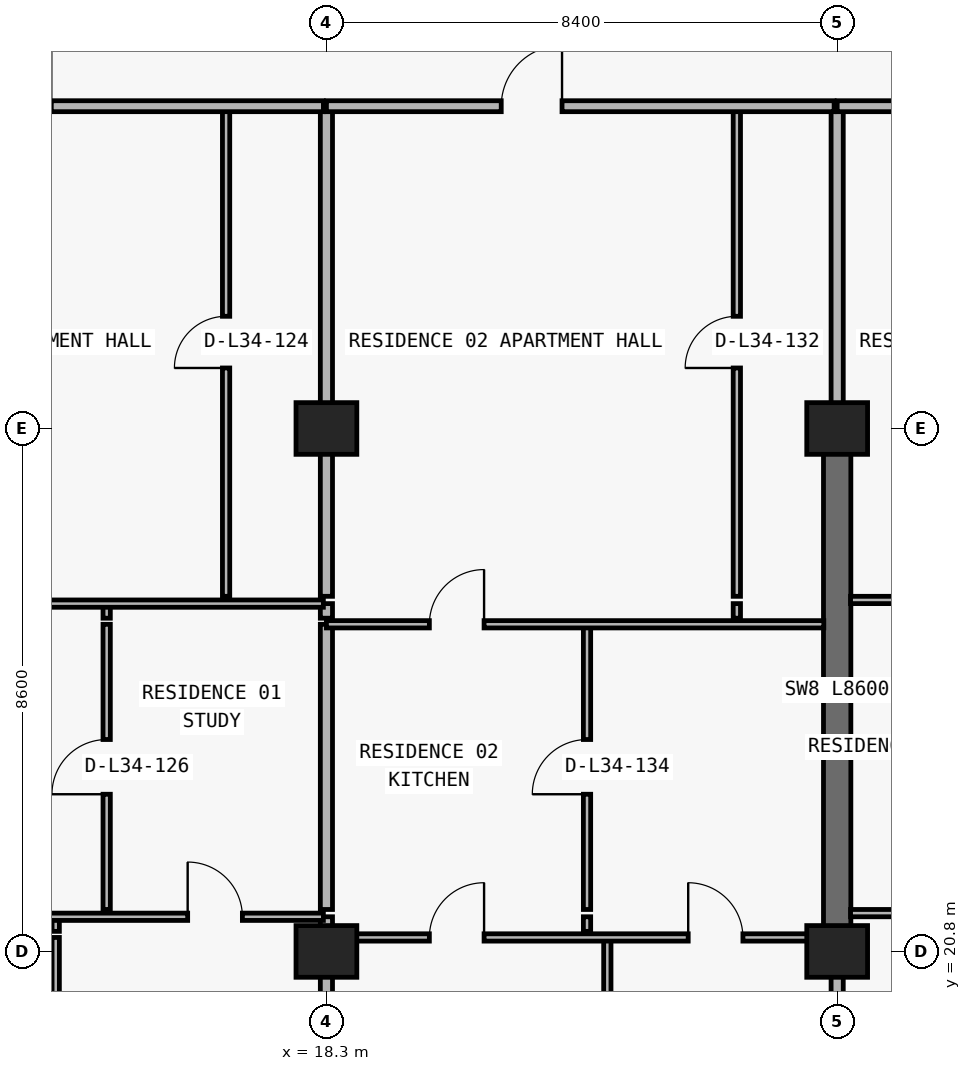
"""IFC4 building model, lengths in metres.
Left out: names, types, materials, properties, quantities, classifications, styles, units other than length and angle.
Written with IfcOpenShell. Run it as: python <this file> out.ifc"""

import sys

from ifc_helpers import new_model, si_unit, direction, frame, frame_2d, origin, origin_2d, place, context, subcontext, project, spatial, rectangle, extrude, element, fill, save


model = new_model("IFC4")
c1 = context("Model", 3, precision=1e-05, world=origin(), true_north=direction((0.0, 1.0)))
c2 = subcontext(c1, "Body", "Model", "MODEL_VIEW")
j1 = project(units=[si_unit("LENGTHUNIT", "METRE"), si_unit("PLANEANGLEUNIT", "RADIAN")], contexts=[c1])
p1 = place(None, origin())
s1 = spatial("IfcSite", under=j1, at=p1, CompositionType="ELEMENT")
p2 = place(p1, origin())
s2 = spatial("IfcBuilding", under=s1, at=p2, CompositionType="ELEMENT")
p3 = place(p2, frame((0.0, 0.0, 125.7)))
s3 = spatial("IfcBuildingStorey", under=s2, at=p3, CompositionType="ELEMENT", Elevation=125.7)
for number, where, z_axis, x_axis in (
    (1, (18.3, 20.8, 0.0), (0.0, 0.0, 1.0), (1.0, 0.0, 0.0)),
    (2, (26.7, 20.8, 0.0), (0.0, 0.0, 1.0), (1.0, 0.0, 0.0)),
    (3, (18.3, 29.4, 0.0), (0.0, 0.0, 1.0), (1.0, 0.0, 0.0)),
    (4, (26.7, 29.4, 0.0), (0.0, 0.0, 1.0), (1.0, 0.0, 0.0)),
):
    element("IfcColumn", number, at=place(p3, frame(where, z_axis=z_axis, x_axis=x_axis)), inside=s3, PredefinedType="COLUMN", context=c2, shape_type="SweptSolid", body=[
        extrude(rectangle(XDim=1.0, YDim=0.85, at=origin_2d()), origin(), (0.0, 0.0, 1.0), 3.05),
    ])
p4 = place(p3, frame((26.7, 20.8, 0.0), z_axis=(0.0, 0.0, 1.0), x_axis=(0.0, 1.0, 0.0)))
e5 = element("IfcWall", 5, at=p4, inside=s3, PredefinedType="SHEAR", context=c2, shape_type="SweptSolid", body=[
    extrude(rectangle(XDim=8.6, YDim=0.45, at=frame_2d((4.3, 0.0))), origin(), (0.0, 0.0, 1.0), 3.05),
])
p5 = place(p3, frame((13.848, 8.84, 0.0), z_axis=(0.0, 0.0, 1.0), x_axis=(0.0, 1.0, 0.0)))
e6 = element("IfcWall", 6, at=p5, inside=s3, PredefinedType="PARTITIONING", context=c2, shape_type="SweptSolid", body=[
    extrude(rectangle(XDim=12.19, YDim=0.12, at=frame_2d((6.095, 0.0))), origin(), (0.0, 0.0, 1.0), 3.05),
])
p6 = place(p3, frame((13.848, 21.13, 0.0), z_axis=(0.0, 0.0, 1.0), x_axis=(0.0, 1.0, 0.0)))
e7 = element("IfcWall", 7, at=p6, inside=s3, PredefinedType="PARTITIONING", context=c2, shape_type="SweptSolid", body=[
    extrude(rectangle(XDim=0.24, YDim=0.12, at=frame_2d((0.12, 0.0))), origin(), (0.0, 0.0, 1.0), 3.05),
])
p7 = place(p3, frame((14.686, 21.49, 0.0), z_axis=(0.0, 0.0, 1.0), x_axis=(0.0, 1.0, 0.0)))
e8 = element("IfcWall", 8, at=p7, inside=s3, PredefinedType="PARTITIONING", context=c2, shape_type="SweptSolid", body=[
    extrude(rectangle(XDim=4.69, YDim=0.12, at=frame_2d((2.345, 0.0))), origin(), (0.0, 0.0, 1.0), 3.05),
])
p8 = place(p7, frame((1.895, 0.0, 0.0)))
e9 = element("IfcOpeningElement", 9, at=p8, cuts=e8, PredefinedType="OPENING", context=c2, shape_type="SweptSolid", body=[
    extrude(rectangle(XDim=0.9, YDim=2.15, at=frame_2d((0.45, 1.075))), frame((0.0, 0.07, 0.0), z_axis=(0.0, -1.0, 0.0), x_axis=(1.0, 0.0, 0.0)), (0.0, 0.0, 1.0), 0.14),
])
p9 = place(p3, frame((14.686, 26.28, 0.0), z_axis=(0.0, 0.0, 1.0), x_axis=(0.0, 1.0, 0.0)))
e10 = element("IfcWall", 10, at=p9, inside=s3, PredefinedType="PARTITIONING", context=c2, shape_type="SweptSolid", body=[
    extrude(rectangle(XDim=0.24, YDim=0.12, at=frame_2d((0.12, 0.0))), origin(), (0.0, 0.0, 1.0), 3.05),
])
p10 = place(p3, frame((16.65, 26.64, 0.0), z_axis=(0.0, 0.0, 1.0), x_axis=(0.0, 1.0, 0.0)))
e11 = element("IfcWall", 11, at=p10, inside=s3, PredefinedType="PARTITIONING", context=c2, shape_type="SweptSolid", body=[
    extrude(rectangle(XDim=8.06, YDim=0.12, at=frame_2d((4.03, 0.0))), origin(), (0.0, 0.0, 1.0), 3.05),
])
p11 = place(p10, frame((3.755, 0.0, 0.0)))
e12 = element("IfcOpeningElement", 12, at=p11, cuts=e11, PredefinedType="OPENING", context=c2, shape_type="SweptSolid", body=[
    extrude(rectangle(XDim=0.85, YDim=2.1, at=frame_2d((0.425, 1.05))), frame((0.0, 0.07, 0.0), z_axis=(0.0, -1.0, 0.0), x_axis=(1.0, 0.0, 0.0)), (0.0, 0.0, 1.0), 0.14),
])
p12 = place(p3, frame((18.3, 8.84, 0.0), z_axis=(0.0, 0.0, 1.0), x_axis=(0.0, 1.0, 0.0)))
e13 = element("IfcWall", 13, at=p12, inside=s3, PredefinedType="PARTITIONING", context=c2, shape_type="SweptSolid", body=[
    extrude(rectangle(XDim=12.19, YDim=0.2, at=frame_2d((6.095, 0.0))), origin(), (0.0, 0.0, 1.0), 2.174),
])
p13 = place(p3, frame((18.3, 21.13, 0.0), z_axis=(0.0, 0.0, 1.0), x_axis=(0.0, 1.0, 0.0)))
e14 = element("IfcWall", 14, at=p13, inside=s3, PredefinedType="PARTITIONING", context=c2, shape_type="SweptSolid", body=[
    extrude(rectangle(XDim=0.24, YDim=0.2, at=frame_2d((0.12, 0.0))), origin(), (0.0, 0.0, 1.0), 2.174),
])
p14 = place(p3, frame((18.3, 21.49, 0.0), z_axis=(0.0, 0.0, 1.0), x_axis=(0.0, 1.0, 0.0)))
e15 = element("IfcWall", 15, at=p14, inside=s3, PredefinedType="PARTITIONING", context=c2, shape_type="SweptSolid", body=[
    extrude(rectangle(XDim=4.69, YDim=0.2, at=frame_2d((2.345, 0.0))), origin(), (0.0, 0.0, 1.0), 2.174),
])
p15 = place(p3, frame((18.3, 26.28, 0.0), z_axis=(0.0, 0.0, 1.0), x_axis=(0.0, 1.0, 0.0)))
e16 = element("IfcWall", 16, at=p15, inside=s3, PredefinedType="PARTITIONING", context=c2, shape_type="SweptSolid", body=[
    extrude(rectangle(XDim=0.24, YDim=0.2, at=frame_2d((0.12, 0.0))), origin(), (0.0, 0.0, 1.0), 2.174),
])
p16 = place(p3, frame((18.3, 26.64, 0.0), z_axis=(0.0, 0.0, 1.0), x_axis=(0.0, 1.0, 0.0)))
e17 = element("IfcWall", 17, at=p16, inside=s3, PredefinedType="PARTITIONING", context=c2, shape_type="SweptSolid", body=[
    extrude(rectangle(XDim=8.06, YDim=0.2, at=frame_2d((4.03, 0.0))), origin(), (0.0, 0.0, 1.0), 2.174),
])
p17 = place(p3, frame((22.586, 21.13, 0.0), z_axis=(0.0, 0.0, 1.0), x_axis=(0.0, 1.0, 0.0)))
e18 = element("IfcWall", 18, at=p17, inside=s3, PredefinedType="PARTITIONING", context=c2, shape_type="SweptSolid", body=[
    extrude(rectangle(XDim=0.24, YDim=0.12, at=frame_2d((0.12, 0.0))), origin(), (0.0, 0.0, 1.0), 3.05),
])
p18 = place(p3, frame((22.586, 21.49, 0.0), z_axis=(0.0, 0.0, 1.0), x_axis=(0.0, 1.0, 0.0)))
e19 = element("IfcWall", 19, at=p18, inside=s3, PredefinedType="PARTITIONING", context=c2, shape_type="SweptSolid", body=[
    extrude(rectangle(XDim=4.69, YDim=0.12, at=frame_2d((2.345, 0.0))), origin(), (0.0, 0.0, 1.0), 3.05),
])
p19 = place(p18, frame((1.895, 0.0, 0.0)))
e20 = element("IfcOpeningElement", 20, at=p19, cuts=e19, PredefinedType="OPENING", context=c2, shape_type="SweptSolid", body=[
    extrude(rectangle(XDim=0.9, YDim=2.15, at=frame_2d((0.45, 1.075))), frame((0.0, 0.07, 0.0), z_axis=(0.0, -1.0, 0.0), x_axis=(1.0, 0.0, 0.0)), (0.0, 0.0, 1.0), 0.14),
])
p20 = place(p3, frame((22.92, 8.84, 0.0), z_axis=(0.0, 0.0, 1.0), x_axis=(0.0, 1.0, 0.0)))
e21 = element("IfcWall", 21, at=p20, inside=s3, PredefinedType="PARTITIONING", context=c2, shape_type="SweptSolid", body=[
    extrude(rectangle(XDim=12.19, YDim=0.12, at=frame_2d((6.095, 0.0))), origin(), (0.0, 0.0, 1.0), 3.05),
])
p21 = place(p3, frame((25.05, 26.28, 0.0), z_axis=(0.0, 0.0, 1.0), x_axis=(0.0, 1.0, 0.0)))
e22 = element("IfcWall", 22, at=p21, inside=s3, PredefinedType="PARTITIONING", context=c2, shape_type="SweptSolid", body=[
    extrude(rectangle(XDim=0.24, YDim=0.12, at=frame_2d((0.12, 0.0))), origin(), (0.0, 0.0, 1.0), 3.05),
])
p22 = place(p3, frame((25.05, 26.64, 0.0), z_axis=(0.0, 0.0, 1.0), x_axis=(0.0, 1.0, 0.0)))
e23 = element("IfcWall", 23, at=p22, inside=s3, PredefinedType="PARTITIONING", context=c2, shape_type="SweptSolid", body=[
    extrude(rectangle(XDim=8.06, YDim=0.12, at=frame_2d((4.03, 0.0))), origin(), (0.0, 0.0, 1.0), 3.05),
])
p23 = place(p22, frame((3.755, 0.0, 0.0)))
e24 = element("IfcOpeningElement", 24, at=p23, cuts=e23, PredefinedType="OPENING", context=c2, shape_type="SweptSolid", body=[
    extrude(rectangle(XDim=0.85, YDim=2.1, at=frame_2d((0.425, 1.05))), frame((0.0, 0.07, 0.0), z_axis=(0.0, -1.0, 0.0), x_axis=(1.0, 0.0, 0.0)), (0.0, 0.0, 1.0), 0.14),
])
p24 = place(p3, frame((26.7, 8.84, 0.0), z_axis=(0.0, 0.0, 1.0), x_axis=(0.0, 1.0, 0.0)))
e25 = element("IfcWall", 25, at=p24, inside=s3, PredefinedType="PARTITIONING", context=c2, shape_type="SweptSolid", body=[
    extrude(rectangle(XDim=11.955, YDim=0.2, at=frame_2d((5.978, 0.0))), origin(), (0.0, 0.0, 1.0), 2.174),
])
p25 = place(p3, frame((26.7, 29.405, 0.0), z_axis=(0.0, 0.0, 1.0), x_axis=(0.0, 1.0, 0.0)))
e26 = element("IfcWall", 26, at=p25, inside=s3, PredefinedType="PARTITIONING", context=c2, shape_type="SweptSolid", body=[
    extrude(rectangle(XDim=5.295, YDim=0.2, at=frame_2d((2.647, 0.0))), origin(), (0.0, 0.0, 1.0), 2.335),
])
p26 = place(p3, frame((18.3, 21.03, 0.0), z_axis=(0.0, 0.0, 1.0), x_axis=(1.0, 0.0, 0.0)))
e27 = element("IfcWall", 27, at=p26, inside=s3, PredefinedType="PARTITIONING", context=c2, shape_type="SweptSolid", body=[
    extrude(rectangle(XDim=8.18, YDim=0.12, at=frame_2d((4.09, 0.0))), origin(), (0.0, 0.0, 1.0), 2.174),
])
p27 = place(p26, frame((1.693, 0.0, 0.0)))
e28 = element("IfcOpeningElement", 28, at=p27, cuts=e27, PredefinedType="OPENING", context=c2, shape_type="SweptSolid", body=[
    extrude(rectangle(XDim=0.9, YDim=2.124, at=frame_2d((0.45, 1.062))), frame((0.0, 0.07, 0.0), z_axis=(0.0, -1.0, 0.0), x_axis=(1.0, 0.0, 0.0)), (0.0, 0.0, 1.0), 0.14),
])
p28 = place(p26, frame((5.95, 0.0, 0.0)))
e29 = element("IfcOpeningElement", 29, at=p28, cuts=e27, PredefinedType="OPENING", context=c2, shape_type="SweptSolid", body=[
    extrude(rectangle(XDim=0.9, YDim=2.124, at=frame_2d((0.45, 1.062))), frame((0.0, 0.07, 0.0), z_axis=(0.0, -1.0, 0.0), x_axis=(1.0, 0.0, 0.0)), (0.0, 0.0, 1.0), 0.14),
])
p29 = place(p3, frame((9.9, 21.37, 0.0), z_axis=(0.0, 0.0, 1.0), x_axis=(1.0, 0.0, 0.0)))
e30 = element("IfcWall", 30, at=p29, inside=s3, PredefinedType="PARTITIONING", context=c2, shape_type="SweptSolid", body=[
    extrude(rectangle(XDim=8.35, YDim=0.12, at=frame_2d((4.175, 0.0))), origin(), (0.0, 0.0, 1.0), 3.05),
])
p30 = place(p29, frame((1.524, 0.0, 0.0)))
e31 = element("IfcOpeningElement", 31, at=p30, cuts=e30, PredefinedType="OPENING", context=c2, shape_type="SweptSolid", body=[
    extrude(rectangle(XDim=0.9, YDim=2.15, at=frame_2d((0.45, 1.075))), frame((0.0, 0.07, 0.0), z_axis=(0.0, -1.0, 0.0), x_axis=(1.0, 0.0, 0.0)), (0.0, 0.0, 1.0), 0.14),
])
p31 = place(p29, frame((6.118, 0.0, 0.0)))
e32 = element("IfcOpeningElement", 32, at=p31, cuts=e30, PredefinedType="OPENING", context=c2, shape_type="SweptSolid", body=[
    extrude(rectangle(XDim=0.9, YDim=2.15, at=frame_2d((0.45, 1.075))), frame((0.0, 0.07, 0.0), z_axis=(0.0, -1.0, 0.0), x_axis=(1.0, 0.0, 0.0)), (0.0, 0.0, 1.0), 0.14),
])
p32 = place(p3, frame((26.92, 21.43, 0.0), z_axis=(0.0, 0.0, 1.0), x_axis=(1.0, 0.0, 0.0)))
e33 = element("IfcWall", 33, at=p32, inside=s3, PredefinedType="PARTITIONING", context=c2, shape_type="SweptSolid", body=[
    extrude(rectangle(XDim=8.18, YDim=0.12, at=frame_2d((4.09, 0.0))), origin(), (0.0, 0.0, 1.0), 3.05),
])
p33 = place(p32, frame((1.414, 0.0, 0.0)))
e34 = element("IfcOpeningElement", 34, at=p33, cuts=e33, PredefinedType="OPENING", context=c2, shape_type="SweptSolid", body=[
    extrude(rectangle(XDim=0.9, YDim=2.15, at=frame_2d((0.45, 1.075))), frame((0.0, 0.07, 0.0), z_axis=(0.0, -1.0, 0.0), x_axis=(1.0, 0.0, 0.0)), (0.0, 0.0, 1.0), 0.14),
])
p34 = place(p32, frame((5.798, 0.0, 0.0)))
e35 = element("IfcOpeningElement", 35, at=p34, cuts=e33, PredefinedType="OPENING", context=c2, shape_type="SweptSolid", body=[
    extrude(rectangle(XDim=0.9, YDim=2.15, at=frame_2d((0.45, 1.075))), frame((0.0, 0.07, 0.0), z_axis=(0.0, -1.0, 0.0), x_axis=(1.0, 0.0, 0.0)), (0.0, 0.0, 1.0), 0.14),
])
p35 = place(p3, frame((18.3, 26.18, 0.0), z_axis=(0.0, 0.0, 1.0), x_axis=(1.0, 0.0, 0.0)))
e36 = element("IfcWall", 36, at=p35, inside=s3, PredefinedType="PARTITIONING", context=c2, shape_type="SweptSolid", body=[
    extrude(rectangle(XDim=8.18, YDim=0.12, at=frame_2d((4.09, 0.0))), origin(), (0.0, 0.0, 1.0), 3.05),
])
p36 = place(p35, frame((1.693, 0.0, 0.0)))
e37 = element("IfcOpeningElement", 37, at=p36, cuts=e36, PredefinedType="OPENING", context=c2, shape_type="SweptSolid", body=[
    extrude(rectangle(XDim=0.9, YDim=2.15, at=frame_2d((0.45, 1.075))), frame((0.0, 0.07, 0.0), z_axis=(0.0, -1.0, 0.0), x_axis=(1.0, 0.0, 0.0)), (0.0, 0.0, 1.0), 0.14),
])
p37 = place(p3, frame((9.9, 26.52, 0.0), z_axis=(0.0, 0.0, 1.0), x_axis=(1.0, 0.0, 0.0)))
e38 = element("IfcWall", 38, at=p37, inside=s3, PredefinedType="PARTITIONING", context=c2, shape_type="SweptSolid", body=[
    extrude(rectangle(XDim=8.35, YDim=0.12, at=frame_2d((4.175, 0.0))), origin(), (0.0, 0.0, 1.0), 3.05),
])
p38 = place(p37, frame((1.943, 0.0, 0.0)))
e39 = element("IfcOpeningElement", 39, at=p38, cuts=e38, PredefinedType="OPENING", context=c2, shape_type="SweptSolid", body=[
    extrude(rectangle(XDim=0.9, YDim=2.15, at=frame_2d((0.45, 1.075))), frame((0.0, 0.07, 0.0), z_axis=(0.0, -1.0, 0.0), x_axis=(1.0, 0.0, 0.0)), (0.0, 0.0, 1.0), 0.14),
])
p39 = place(p3, frame((26.92, 26.58, 0.0), z_axis=(0.0, 0.0, 1.0), x_axis=(1.0, 0.0, 0.0)))
e40 = element("IfcWall", 40, at=p39, inside=s3, PredefinedType="PARTITIONING", context=c2, shape_type="SweptSolid", body=[
    extrude(rectangle(XDim=8.18, YDim=0.12, at=frame_2d((4.09, 0.0))), origin(), (0.0, 0.0, 1.0), 3.05),
])
p40 = place(p39, frame((1.708, 0.0, 0.0)))
e41 = element("IfcOpeningElement", 41, at=p40, cuts=e40, PredefinedType="OPENING", context=c2, shape_type="SweptSolid", body=[
    extrude(rectangle(XDim=0.9, YDim=2.15, at=frame_2d((0.45, 1.075))), frame((0.0, 0.07, 0.0), z_axis=(0.0, -1.0, 0.0), x_axis=(1.0, 0.0, 0.0)), (0.0, 0.0, 1.0), 0.14),
])
p41 = place(p3, frame((7.705, 34.7, 0.0), z_axis=(0.0, 0.0, 1.0), x_axis=(1.0, 0.0, 0.0)))
e42 = element("IfcWall", 42, at=p41, inside=s3, PredefinedType="PARTITIONING", context=c2, shape_type="SweptSolid", body=[
    extrude(rectangle(XDim=10.545, YDim=0.18, at=frame_2d((5.272, 0.0))), origin(), (0.0, 0.0, 1.0), 3.05),
])
p42 = place(p41, frame((5.07, 0.0, 0.0)))
e43 = element("IfcOpeningElement", 43, at=p42, cuts=e42, PredefinedType="OPENING", context=c2, shape_type="SweptSolid", body=[
    extrude(rectangle(XDim=1.0, YDim=2.2, at=frame_2d((0.5, 1.1))), frame((0.0, 0.1, 0.0), z_axis=(0.0, -1.0, 0.0), x_axis=(1.0, 0.0, 0.0)), (0.0, 0.0, 1.0), 0.2),
])
p43 = place(p3, frame((18.3, 34.7, 0.0), z_axis=(0.0, 0.0, 1.0), x_axis=(1.0, 0.0, 0.0)))
e44 = element("IfcWall", 44, at=p43, inside=s3, PredefinedType="PARTITIONING", context=c2, shape_type="SweptSolid", body=[
    extrude(rectangle(XDim=8.35, YDim=0.18, at=frame_2d((4.175, 0.0))), origin(), (0.0, 0.0, 1.0), 3.05),
])
p44 = place(p43, frame((2.875, 0.0, 0.0)))
e45 = element("IfcOpeningElement", 45, at=p44, cuts=e44, PredefinedType="OPENING", context=c2, shape_type="SweptSolid", body=[
    extrude(rectangle(XDim=1.0, YDim=2.2, at=frame_2d((0.5, 1.1))), frame((0.0, 0.1, 0.0), z_axis=(0.0, -1.0, 0.0), x_axis=(1.0, 0.0, 0.0)), (0.0, 0.0, 1.0), 0.2),
])
p45 = place(p3, frame((26.7, 34.7, 0.0), z_axis=(0.0, 0.0, 1.0), x_axis=(1.0, 0.0, 0.0)))
e46 = element("IfcWall", 46, at=p45, inside=s3, PredefinedType="PARTITIONING", context=c2, shape_type="SweptSolid", body=[
    extrude(rectangle(XDim=32.8, YDim=0.18, at=frame_2d((16.4, 0.0))), origin(), (0.0, 0.0, 1.0), 3.05),
])
p46 = place(p45, frame((2.875, 0.0, 0.0)))
e47 = element("IfcOpeningElement", 47, at=p46, cuts=e46, PredefinedType="OPENING", context=c2, shape_type="SweptSolid", body=[
    extrude(rectangle(XDim=1.0, YDim=2.2, at=frame_2d((0.5, 1.1))), frame((0.0, 0.1, 0.0), z_axis=(0.0, -1.0, 0.0), x_axis=(1.0, 0.0, 0.0)), (0.0, 0.0, 1.0), 0.2),
])
p47 = place(p45, frame((10.875, 0.0, 0.0)))
e48 = element("IfcOpeningElement", 48, at=p47, cuts=e46, PredefinedType="OPENING", context=c2, shape_type="SweptSolid", body=[
    extrude(rectangle(XDim=1.0, YDim=2.2, at=frame_2d((0.5, 1.1))), frame((0.0, 0.1, 0.0), z_axis=(0.0, -1.0, 0.0), x_axis=(1.0, 0.0, 0.0)), (0.0, 0.0, 1.0), 0.2),
])
p48 = place(p45, frame((18.875, 0.0, 0.0)))
e49 = element("IfcOpeningElement", 49, at=p48, cuts=e46, PredefinedType="OPENING", context=c2, shape_type="SweptSolid", body=[
    extrude(rectangle(XDim=1.0, YDim=2.2, at=frame_2d((0.5, 1.1))), frame((0.0, 0.1, 0.0), z_axis=(0.0, -1.0, 0.0), x_axis=(1.0, 0.0, 0.0)), (0.0, 0.0, 1.0), 0.2),
])
p49 = place(p45, frame((27.275, 0.0, 0.0)))
e50 = element("IfcOpeningElement", 50, at=p49, cuts=e46, PredefinedType="OPENING", context=c2, shape_type="SweptSolid", body=[
    extrude(rectangle(XDim=1.0, YDim=2.2, at=frame_2d((0.5, 1.1))), frame((0.0, 0.1, 0.0), z_axis=(0.0, -1.0, 0.0), x_axis=(1.0, 0.0, 0.0)), (0.0, 0.0, 1.0), 0.2),
])
p50 = place(p11, origin())
e51 = element("IfcDoor", 51, at=p50, inside=s3, OperationType="SINGLE_SWING_LEFT", PredefinedType="DOOR", context=c2, shape_type="SweptSolid", body=[
    extrude(rectangle(XDim=0.85, YDim=2.1, at=frame_2d((0.425, 1.05))), frame((0.0, 0.025, 0.0), z_axis=(0.0, -1.0, 0.0), x_axis=(1.0, 0.0, 0.0)), (0.0, 0.0, 1.0), 0.05),
])
fill(e12, e51)
p51 = place(p8, origin())
e52 = element("IfcDoor", 52, at=p51, inside=s3, OperationType="SINGLE_SWING_LEFT", PredefinedType="DOOR", context=c2, shape_type="SweptSolid", body=[
    extrude(rectangle(XDim=0.9, YDim=2.15, at=frame_2d((0.45, 1.075))), frame((0.0, 0.025, 0.0), z_axis=(0.0, -1.0, 0.0), x_axis=(1.0, 0.0, 0.0)), (0.0, 0.0, 1.0), 0.05),
])
fill(e9, e52)
p52 = place(p31, origin())
e53 = element("IfcDoor", 53, at=p52, inside=s3, OperationType="SINGLE_SWING_LEFT", PredefinedType="DOOR", context=c2, shape_type="SweptSolid", body=[
    extrude(rectangle(XDim=0.9, YDim=2.15, at=frame_2d((0.45, 1.075))), frame((0.0, 0.025, 0.0), z_axis=(0.0, -1.0, 0.0), x_axis=(1.0, 0.0, 0.0)), (0.0, 0.0, 1.0), 0.05),
])
fill(e32, e53)
p53 = place(p44, origin())
e54 = element("IfcDoor", 54, at=p53, inside=s3, OperationType="SINGLE_SWING_RIGHT", PredefinedType="DOOR", context=c2, shape_type="SweptSolid", body=[
    extrude(rectangle(XDim=1.0, YDim=2.2, at=frame_2d((0.5, 1.1))), frame((0.0, 0.025, 0.0), z_axis=(0.0, -1.0, 0.0), x_axis=(1.0, 0.0, 0.0)), (0.0, 0.0, 1.0), 0.05),
])
fill(e45, e54)
p54 = place(p23, origin())
e55 = element("IfcDoor", 55, at=p54, inside=s3, OperationType="SINGLE_SWING_LEFT", PredefinedType="DOOR", context=c2, shape_type="SweptSolid", body=[
    extrude(rectangle(XDim=0.85, YDim=2.1, at=frame_2d((0.425, 1.05))), frame((0.0, 0.025, 0.0), z_axis=(0.0, -1.0, 0.0), x_axis=(1.0, 0.0, 0.0)), (0.0, 0.0, 1.0), 0.05),
])
fill(e24, e55)
p55 = place(p36, origin())
e56 = element("IfcDoor", 56, at=p55, inside=s3, OperationType="SINGLE_SWING_RIGHT", PredefinedType="DOOR", context=c2, shape_type="SweptSolid", body=[
    extrude(rectangle(XDim=0.9, YDim=2.15, at=frame_2d((0.45, 1.075))), frame((0.0, 0.025, 0.0), z_axis=(0.0, -1.0, 0.0), x_axis=(1.0, 0.0, 0.0)), (0.0, 0.0, 1.0), 0.05),
])
fill(e37, e56)
p56 = place(p19, origin())
e57 = element("IfcDoor", 57, at=p56, inside=s3, OperationType="SINGLE_SWING_LEFT", PredefinedType="DOOR", context=c2, shape_type="SweptSolid", body=[
    extrude(rectangle(XDim=0.9, YDim=2.15, at=frame_2d((0.45, 1.075))), frame((0.0, 0.025, 0.0), z_axis=(0.0, -1.0, 0.0), x_axis=(1.0, 0.0, 0.0)), (0.0, 0.0, 1.0), 0.05),
])
fill(e20, e57)
p57 = place(p27, origin())
e58 = element("IfcDoor", 58, at=p57, inside=s3, OperationType="SINGLE_SWING_RIGHT", PredefinedType="DOOR", context=c2, shape_type="SweptSolid", body=[
    extrude(rectangle(XDim=0.9, YDim=2.124, at=frame_2d((0.45, 1.062))), frame((0.0, 0.025, 0.0), z_axis=(0.0, -1.0, 0.0), x_axis=(1.0, 0.0, 0.0)), (0.0, 0.0, 1.0), 0.05),
])
fill(e28, e58)
p58 = place(p28, origin())
e59 = element("IfcDoor", 59, at=p58, inside=s3, OperationType="SINGLE_SWING_LEFT", PredefinedType="DOOR", context=c2, shape_type="SweptSolid", body=[
    extrude(rectangle(XDim=0.9, YDim=2.124, at=frame_2d((0.45, 1.062))), frame((0.0, 0.025, 0.0), z_axis=(0.0, -1.0, 0.0), x_axis=(1.0, 0.0, 0.0)), (0.0, 0.0, 1.0), 0.05),
])
fill(e29, e59)
save(model, sys.argv[1])
